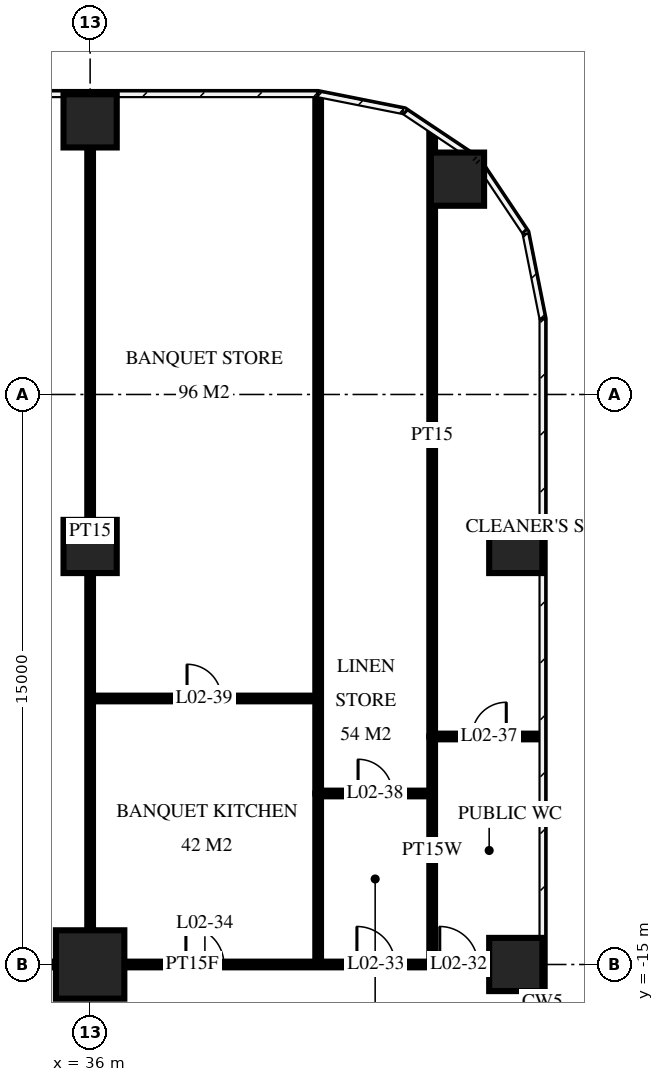
"""IFC4 building model, lengths in metres.
Left out: names, types, materials, properties, quantities, classifications, styles, units other than length and angle.
Written with IfcOpenShell. Run it as: python <this file> out.ifc"""

import sys

from ifc_helpers import new_model, si_unit, direction, frame, frame_2d, origin, origin_2d, place, context, subcontext, project, spatial, rectangle, circle, extrude, element, fill, save


model = new_model("IFC4")
c1 = context("Model", 3, precision=1e-05, world=origin(), true_north=direction((0.0, 1.0)))
c2 = subcontext(c1, "Body", "Model", "MODEL_VIEW")
j1 = project(units=[si_unit("LENGTHUNIT", "METRE"), si_unit("PLANEANGLEUNIT", "RADIAN")], contexts=[c1])
p1 = place(None, origin())
s1 = spatial("IfcSite", under=j1, at=p1, CompositionType="ELEMENT")
p2 = place(p1, origin())
s2 = spatial("IfcBuilding", under=s1, at=p2, CompositionType="ELEMENT")
p3 = place(p2, frame((0.0, 0.0, 12.5)))
s3 = spatial("IfcBuildingStorey", under=s2, at=p3, CompositionType="ELEMENT", Elevation=12.5)
p4 = place(p3, frame((36.0, -15.0, 0.0), z_axis=(0.0, 0.0, 1.0), x_axis=(1.0, 0.0, 0.0)))
e1 = element("IfcColumn", 1, at=p4, inside=s3, PredefinedType="COLUMN", context=c2, shape_type="SweptSolid", body=[
    extrude(circle(Radius=0.9, at=origin_2d()), origin(), (0.0, 0.0, 1.0), 5.5),
])
for number, where, z_axis, x_axis in (
    (2, (36.0, -4.0, 0.0), (0.0, 0.0, 1.0), (1.0, 0.0, 0.0)),
    (3, (36.0, 7.2, 0.0), (0.0, 0.0, 1.0), (1.0, 0.0, 0.0)),
    (4, (45.666, 5.666, 0.0), (0.0, 0.0, 1.0), (1.0, 0.0, 0.0)),
    (5, (47.2, -15.0, 0.0), (0.0, 0.0, 1.0), (1.0, 0.0, 0.0)),
    (6, (47.2, -4.0, 0.0), (0.0, 0.0, 1.0), (1.0, 0.0, 0.0)),
):
    element("IfcColumn", number, at=place(p3, frame(where, z_axis=z_axis, x_axis=x_axis)), inside=s3, PredefinedType="COLUMN", context=c2, shape_type="SweptSolid", body=[
        extrude(circle(Radius=0.7, at=origin_2d()), origin(), (0.0, 0.0, 1.0), 5.5),
    ])
p5 = place(p3, frame((45.0, -9.0, 0.0), z_axis=(0.0, 0.0, 1.0), x_axis=(0.0, 1.0, 0.0)))
e7 = element("IfcWall", 7, at=p5, inside=s3, PredefinedType="PARTITIONING", context=c2, shape_type="SweptSolid", body=[
    extrude(rectangle(XDim=15.856, YDim=0.15, at=frame_2d((7.928, 0.0))), origin(), (0.0, 0.0, 1.0), 5.05),
])
p6 = place(p3, frame((45.0, -15.0, 0.0), z_axis=(0.0, 0.0, 1.0), x_axis=(0.0, 1.0, 0.0)))
e8 = element("IfcWall", 8, at=p6, inside=s3, PredefinedType="PLUMBINGWALL", context=c2, shape_type="SweptSolid", body=[
    extrude(rectangle(XDim=6.0, YDim=0.15, at=frame_2d((3.0, 0.0))), origin(), (0.0, 0.0, 1.0), 5.05),
])
p7 = place(p3, frame((42.0, -10.5, 0.0), z_axis=(0.0, 0.0, 1.0), x_axis=(0.0, 1.0, 0.0)))
e9 = element("IfcWall", 9, at=p7, inside=s3, PredefinedType="PARTITIONING", context=c2, shape_type="SweptSolid", body=[
    extrude(rectangle(XDim=18.316, YDim=0.15, at=frame_2d((9.158, 0.0))), origin(), (0.0, 0.0, 1.0), 5.05),
])
p8 = place(p3, frame((42.0, -15.0, 0.0), z_axis=(0.0, 0.0, 1.0), x_axis=(0.0, 1.0, 0.0)))
e10 = element("IfcWall", 10, at=p8, inside=s3, PredefinedType="PLUMBINGWALL", context=c2, shape_type="SweptSolid", body=[
    extrude(rectangle(XDim=4.5, YDim=0.15, at=frame_2d((2.25, 0.0))), origin(), (0.0, 0.0, 1.0), 5.05),
])
p9 = place(p3, frame((36.0, -15.0, 0.0), z_axis=(0.0, 0.0, 1.0), x_axis=(0.0, 1.0, 0.0)))
e11 = element("IfcWall", 11, at=p9, inside=s3, PredefinedType="PARTITIONING", context=c2, shape_type="SweptSolid", body=[
    extrude(rectangle(XDim=22.82, YDim=0.15, at=frame_2d((11.41, 0.0))), origin(), (0.0, 0.0, 1.0), 5.05),
])
p10 = place(p3, frame((29.55, -15.0, 0.0), z_axis=(0.0, 0.0, 1.0), x_axis=(1.0, 0.0, 0.0)))
e12 = element("IfcWall", 12, at=p10, inside=s3, PredefinedType="PARTITIONING", context=c2, shape_type="SweptSolid", body=[
    extrude(rectangle(XDim=18.27, YDim=0.15, at=frame_2d((9.135, 0.0))), origin(), (0.0, 0.0, 1.0), 5.05),
])
p11 = place(p10, frame((15.65, 0.0, 0.0)))
e13 = element("IfcOpeningElement", 13, at=p11, cuts=e12, PredefinedType="OPENING", context=c2, shape_type="SweptSolid", body=[
    extrude(rectangle(XDim=1.0, YDim=2.1, at=frame_2d((0.5, 1.05))), frame((0.0, 0.085, 0.0), z_axis=(0.0, -1.0, 0.0), x_axis=(1.0, 0.0, 0.0)), (0.0, 0.0, 1.0), 0.17),
])
p12 = place(p10, frame((13.47, 0.0, 0.0)))
e14 = element("IfcOpeningElement", 14, at=p12, cuts=e12, PredefinedType="OPENING", context=c2, shape_type="SweptSolid", body=[
    extrude(rectangle(XDim=1.0, YDim=2.1, at=frame_2d((0.5, 1.05))), frame((0.0, 0.085, 0.0), z_axis=(0.0, -1.0, 0.0), x_axis=(1.0, 0.0, 0.0)), (0.0, 0.0, 1.0), 0.17),
])
p13 = place(p10, frame((8.97, 0.0, 0.0)))
e15 = element("IfcOpeningElement", 15, at=p13, cuts=e12, PredefinedType="OPENING", context=c2, shape_type="SweptSolid", body=[
    extrude(rectangle(XDim=1.0, YDim=2.1, at=frame_2d((0.5, 1.05))), frame((0.0, 0.085, 0.0), z_axis=(0.0, -1.0, 0.0), x_axis=(1.0, 0.0, 0.0)), (0.0, 0.0, 1.0), 0.17),
])
p14 = place(p10, frame((3.92, 0.0, 0.0)))
e16 = element("IfcOpeningElement", 16, at=p14, cuts=e12, PredefinedType="OPENING", context=c2, shape_type="SweptSolid", body=[
    extrude(rectangle(XDim=1.0, YDim=2.1, at=frame_2d((0.5, 1.05))), frame((0.0, 0.085, 0.0), z_axis=(0.0, -1.0, 0.0), x_axis=(1.0, 0.0, 0.0)), (0.0, 0.0, 1.0), 0.17),
])
p15 = place(p10, frame((0.65, 0.0, 0.0)))
e17 = element("IfcOpeningElement", 17, at=p15, cuts=e12, PredefinedType="OPENING", context=c2, shape_type="SweptSolid", body=[
    extrude(rectangle(XDim=1.0, YDim=2.1, at=frame_2d((0.5, 1.05))), frame((0.0, 0.085, 0.0), z_axis=(0.0, -1.0, 0.0), x_axis=(1.0, 0.0, 0.0)), (0.0, 0.0, 1.0), 0.17),
])
p16 = place(p3, frame((42.0, -10.5, 0.0), z_axis=(0.0, 0.0, 1.0), x_axis=(1.0, 0.0, 0.0)))
e18 = element("IfcWall", 18, at=p16, inside=s3, PredefinedType="PLUMBINGWALL", context=c2, shape_type="SweptSolid", body=[
    extrude(rectangle(XDim=3.0, YDim=0.15, at=frame_2d((1.5, 0.0))), origin(), (0.0, 0.0, 1.0), 5.05),
])
p17 = place(p16, frame((1.05, 0.0, 0.0)))
e19 = element("IfcOpeningElement", 19, at=p17, cuts=e18, PredefinedType="OPENING", context=c2, shape_type="SweptSolid", body=[
    extrude(rectangle(XDim=0.9, YDim=2.1, at=frame_2d((0.45, 1.05))), frame((0.0, 0.085, 0.0), z_axis=(0.0, -1.0, 0.0), x_axis=(1.0, 0.0, 0.0)), (0.0, 0.0, 1.0), 0.17),
])
p18 = place(p3, frame((45.0, -9.0, 0.0), z_axis=(0.0, 0.0, 1.0), x_axis=(1.0, 0.0, 0.0)))
e20 = element("IfcWall", 20, at=p18, inside=s3, PredefinedType="PLUMBINGWALL", context=c2, shape_type="SweptSolid", body=[
    extrude(rectangle(XDim=2.82, YDim=0.15, at=frame_2d((1.41, 0.0))), origin(), (0.0, 0.0, 1.0), 5.05),
])
p19 = place(p18, frame((1.05, 0.0, 0.0)))
e21 = element("IfcOpeningElement", 21, at=p19, cuts=e20, PredefinedType="OPENING", context=c2, shape_type="SweptSolid", body=[
    extrude(rectangle(XDim=0.9, YDim=2.1, at=frame_2d((0.45, 1.05))), frame((0.0, 0.085, 0.0), z_axis=(0.0, -1.0, 0.0), x_axis=(1.0, 0.0, 0.0)), (0.0, 0.0, 1.0), 0.17),
])
p20 = place(p3, frame((36.0, -8.0, 0.0), z_axis=(0.0, 0.0, 1.0), x_axis=(1.0, 0.0, 0.0)))
e22 = element("IfcWall", 22, at=p20, inside=s3, PredefinedType="PARTITIONING", context=c2, shape_type="SweptSolid", body=[
    extrude(rectangle(XDim=6.0, YDim=0.15, at=frame_2d((3.0, 0.0))), origin(), (0.0, 0.0, 1.0), 5.05),
])
p21 = place(p20, frame((2.55, 0.0, 0.0)))
e23 = element("IfcOpeningElement", 23, at=p21, cuts=e22, PredefinedType="OPENING", context=c2, shape_type="SweptSolid", body=[
    extrude(rectangle(XDim=0.9, YDim=2.1, at=frame_2d((0.45, 1.05))), frame((0.0, 0.085, 0.0), z_axis=(0.0, -1.0, 0.0), x_axis=(1.0, 0.0, 0.0)), (0.0, 0.0, 1.0), 0.17),
])
p22 = place(p11, origin())
e24 = element("IfcDoor", 24, at=p22, inside=s3, OperationType="SINGLE_SWING_RIGHT", PredefinedType="DOOR", context=c2, shape_type="SweptSolid", body=[
    extrude(rectangle(XDim=1.0, YDim=2.1, at=frame_2d((0.5, 1.05))), frame((0.0, 0.025, 0.0), z_axis=(0.0, -1.0, 0.0), x_axis=(1.0, 0.0, 0.0)), (0.0, 0.0, 1.0), 0.05),
])
fill(e13, e24)
p23 = place(p12, origin())
e25 = element("IfcDoor", 25, at=p23, inside=s3, OperationType="SINGLE_SWING_RIGHT", PredefinedType="DOOR", context=c2, shape_type="SweptSolid", body=[
    extrude(rectangle(XDim=1.0, YDim=2.1, at=frame_2d((0.5, 1.05))), frame((0.0, 0.025, 0.0), z_axis=(0.0, -1.0, 0.0), x_axis=(1.0, 0.0, 0.0)), (0.0, 0.0, 1.0), 0.05),
])
fill(e14, e25)
p24 = place(p13, origin())
e26 = element("IfcDoor", 26, at=p24, inside=s3, OperationType="SINGLE_SWING_RIGHT", PredefinedType="DOOR", context=c2, shape_type="SweptSolid", body=[
    extrude(rectangle(XDim=1.0, YDim=2.1, at=frame_2d((0.5, 1.05))), frame((0.0, 0.025, 0.0), z_axis=(0.0, -1.0, 0.0), x_axis=(1.0, 0.0, 0.0)), (0.0, 0.0, 1.0), 0.05),
])
fill(e15, e26)
p25 = place(p19, origin())
e27 = element("IfcDoor", 27, at=p25, inside=s3, OperationType="SINGLE_SWING_LEFT", PredefinedType="DOOR", context=c2, shape_type="SweptSolid", body=[
    extrude(rectangle(XDim=0.9, YDim=2.1, at=frame_2d((0.45, 1.05))), frame((0.0, 0.025, 0.0), z_axis=(0.0, -1.0, 0.0), x_axis=(1.0, 0.0, 0.0)), (0.0, 0.0, 1.0), 0.05),
])
fill(e21, e27)
p26 = place(p17, origin())
e28 = element("IfcDoor", 28, at=p26, inside=s3, OperationType="SINGLE_SWING_RIGHT", PredefinedType="DOOR", context=c2, shape_type="SweptSolid", body=[
    extrude(rectangle(XDim=0.9, YDim=2.1, at=frame_2d((0.45, 1.05))), frame((0.0, 0.025, 0.0), z_axis=(0.0, -1.0, 0.0), x_axis=(1.0, 0.0, 0.0)), (0.0, 0.0, 1.0), 0.05),
])
fill(e19, e28)
p27 = place(p21, origin())
e29 = element("IfcDoor", 29, at=p27, inside=s3, OperationType="SINGLE_SWING_RIGHT", PredefinedType="DOOR", context=c2, shape_type="SweptSolid", body=[
    extrude(rectangle(XDim=0.9, YDim=2.1, at=frame_2d((0.45, 1.05))), frame((0.0, 0.025, 0.0), z_axis=(0.0, -1.0, 0.0), x_axis=(1.0, 0.0, 0.0)), (0.0, 0.0, 1.0), 0.05),
])
fill(e23, e29)
save(model, sys.argv[1])
